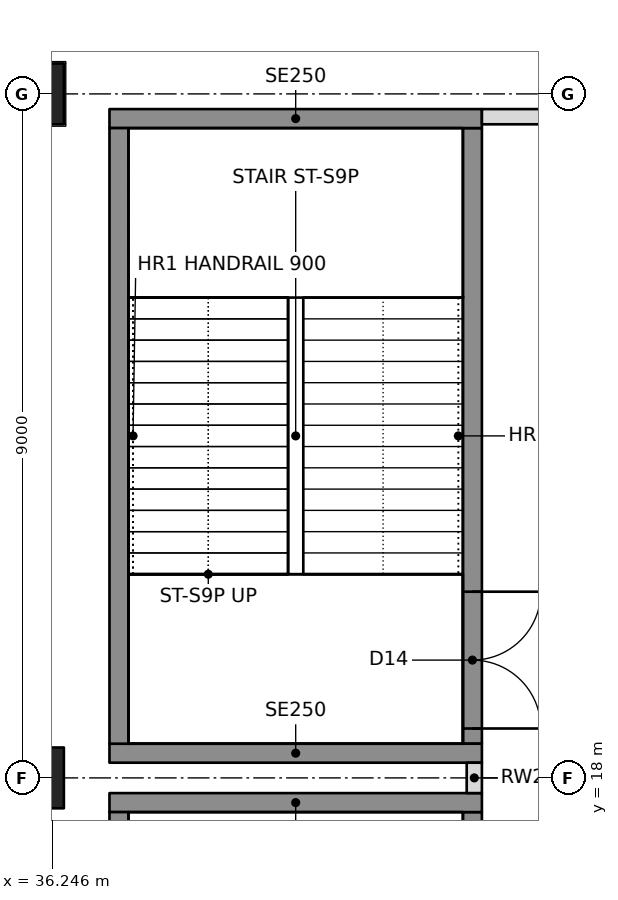
"""IFC4 building model, lengths in metres.
Left out: names, types, materials, properties, quantities, classifications, styles, units other than length and angle.
Written with IfcOpenShell. Run it as: python <this file> out.ifc"""

import sys

from ifc_helpers import new_model, si_unit, direction, frame, frame_2d, origin, origin_2d, place, context, subcontext, project, spatial, rectangle, hollow_rectangle, extrude, element, fill, save


model = new_model("IFC4")
c1 = context("Model", 3, precision=1e-05, world=origin(), true_north=direction((0.0, 1.0)))
c2 = subcontext(c1, "Body", "Model", "MODEL_VIEW")
j1 = project(units=[si_unit("LENGTHUNIT", "METRE"), si_unit("PLANEANGLEUNIT", "RADIAN")], contexts=[c1])
p1 = place(None, origin())
s1 = spatial("IfcSite", under=j1, at=p1, CompositionType="ELEMENT")
p2 = place(p1, origin())
s2 = spatial("IfcBuilding", under=s1, at=p2, CompositionType="ELEMENT")
p3 = place(p2, origin())
s3 = spatial("IfcBuildingStorey", under=s2, at=p3, CompositionType="ELEMENT", Elevation=0.0)
for number, where, z_axis, x_axis in (
    (1, (36.0, 18.0, 0.0), (0.0, 0.0, 1.0), (0.0, 1.0, 0.0)),
    (2, (36.0, 27.0, 0.0), (0.0, 0.0, 1.0), (1.0, 0.0, 0.0)),
):
    element("IfcColumn", number, at=place(p3, frame(where, z_axis=z_axis, x_axis=x_axis)), inside=s3, PredefinedType="COLUMN", context=c2, shape_type="SweptSolid", body=[
        extrude(hollow_rectangle(XDim=0.8, YDim=0.8, WallThickness=0.1, at=origin_2d()), origin(), (0.0, 0.0, 1.0), 6.0),
    ])
p4 = place(p3, frame((41.8, 17.8, 0.0), z_axis=(0.0, 0.0, 1.0), x_axis=(0.0, 1.0, 0.0)))
e3 = element("IfcWall", 3, at=p4, inside=s3, PredefinedType="PARTITIONING", context=c2, shape_type="SweptSolid", body=[
    extrude(rectangle(XDim=0.4, YDim=0.2, at=frame_2d((0.2, 0.0))), origin(), (0.0, 0.0, 1.0), 4.891),
])
p5 = place(p3, frame((41.9, 26.7, 0.0), z_axis=(0.0, 0.0, 1.0), x_axis=(1.0, 0.0, 0.0)))
e4 = element("IfcWall", 4, at=p5, inside=s3, PredefinedType="PARTITIONING", context=c2, shape_type="SweptSolid", body=[
    extrude(rectangle(XDim=2.7, YDim=0.2, at=frame_2d((1.35, 0.0))), origin(), (0.0, 0.0, 1.0), 5.75),
])
p6 = place(p3, frame((37.0, 17.675, 0.0), z_axis=(0.0, 0.0, 1.0), x_axis=(1.0, 0.0, 0.0)))
e5 = element("IfcWall", 5, at=p6, inside=s3, PredefinedType="SOLIDWALL", context=c2, shape_type="SweptSolid", body=[
    extrude(rectangle(XDim=4.9, YDim=0.25, at=frame_2d((2.45, 0.0))), origin(), (0.0, 0.0, 1.0), 5.75),
])
p7 = place(p3, frame((37.125, 9.45, 0.0), z_axis=(0.0, 0.0, 1.0), x_axis=(0.0, 1.0, 0.0)))
e6 = element("IfcWall", 6, at=p7, inside=s3, PredefinedType="SOLIDWALL", context=c2, shape_type="SweptSolid", body=[
    extrude(rectangle(XDim=8.1, YDim=0.25, at=frame_2d((4.05, 0.0))), origin(), (0.0, 0.0, 1.0), 5.75),
])
p8 = place(p3, frame((41.775, 9.45, 0.0), z_axis=(0.0, 0.0, 1.0), x_axis=(0.0, 1.0, 0.0)))
e7 = element("IfcWall", 7, at=p8, inside=s3, PredefinedType="SOLIDWALL", context=c2, shape_type="SweptSolid", body=[
    extrude(rectangle(XDim=8.1, YDim=0.25, at=frame_2d((4.05, 0.0))), origin(), (0.0, 0.0, 1.0), 5.75),
])
p9 = place(p8, frame((0.2, 0.0, 0.0)))
e8 = element("IfcOpeningElement", 8, at=p9, cuts=e7, PredefinedType="OPENING", context=c2, shape_type="SweptSolid", body=[
    extrude(rectangle(XDim=1.8, YDim=2.1, at=frame_2d((0.9, 1.05))), frame((0.0, 0.135, 0.0), z_axis=(0.0, -1.0, 0.0), x_axis=(1.0, 0.0, 0.0)), (0.0, 0.0, 1.0), 0.27),
])
for number, where, z_axis, x_axis in (
    (9, (37.0, 18.325, 0.0), (0.0, 0.0, 1.0), (1.0, 0.0, 0.0)),
    (10, (37.0, 26.675, 0.0), (0.0, 0.0, 1.0), (1.0, 0.0, 0.0)),
):
    element("IfcWall", number, at=place(p3, frame(where, z_axis=z_axis, x_axis=x_axis)), inside=s3, PredefinedType="SOLIDWALL", context=c2, shape_type="SweptSolid", body=[
        extrude(rectangle(XDim=4.9, YDim=0.25, at=frame_2d((2.45, 0.0))), origin(), (0.0, 0.0, 1.0), 5.75),
    ])
p10 = place(p3, frame((37.125, 18.45, 0.0), z_axis=(0.0, 0.0, 1.0), x_axis=(0.0, 1.0, 0.0)))
e11 = element("IfcWall", 11, at=p10, inside=s3, PredefinedType="SOLIDWALL", context=c2, shape_type="SweptSolid", body=[
    extrude(rectangle(XDim=8.1, YDim=0.25, at=frame_2d((4.05, 0.0))), origin(), (0.0, 0.0, 1.0), 5.75),
])
p11 = place(p3, frame((41.775, 18.45, 0.0), z_axis=(0.0, 0.0, 1.0), x_axis=(0.0, 1.0, 0.0)))
e12 = element("IfcWall", 12, at=p11, inside=s3, PredefinedType="SOLIDWALL", context=c2, shape_type="SweptSolid", body=[
    extrude(rectangle(XDim=8.1, YDim=0.25, at=frame_2d((4.05, 0.0))), origin(), (0.0, 0.0, 1.0), 5.75),
])
p12 = place(p11, frame((0.2, 0.0, 0.0)))
e13 = element("IfcOpeningElement", 13, at=p12, cuts=e12, PredefinedType="OPENING", context=c2, shape_type="SweptSolid", body=[
    extrude(rectangle(XDim=1.8, YDim=2.1, at=frame_2d((0.9, 1.05))), frame((0.0, 0.135, 0.0), z_axis=(0.0, -1.0, 0.0), x_axis=(1.0, 0.0, 0.0)), (0.0, 0.0, 1.0), 0.27),
])
p13 = place(p12, frame((1.8, 0.0, 0.0), z_axis=(0.0, 0.0, 1.0), x_axis=(-1.0, 0.0, 0.0)))
e14 = element("IfcDoor", 14, at=p13, inside=s3, OperationType="DOUBLE_DOOR_SINGLE_SWING", PredefinedType="DOOR", context=c2, shape_type="SweptSolid", body=[
    extrude(rectangle(XDim=1.8, YDim=2.1, at=frame_2d((0.9, 1.05))), frame((0.0, 0.025, 0.0), z_axis=(0.0, -1.0, 0.0), x_axis=(1.0, 0.0, 0.0)), (0.0, 0.0, 1.0), 0.05),
])
fill(e13, e14)
save(model, sys.argv[1])
